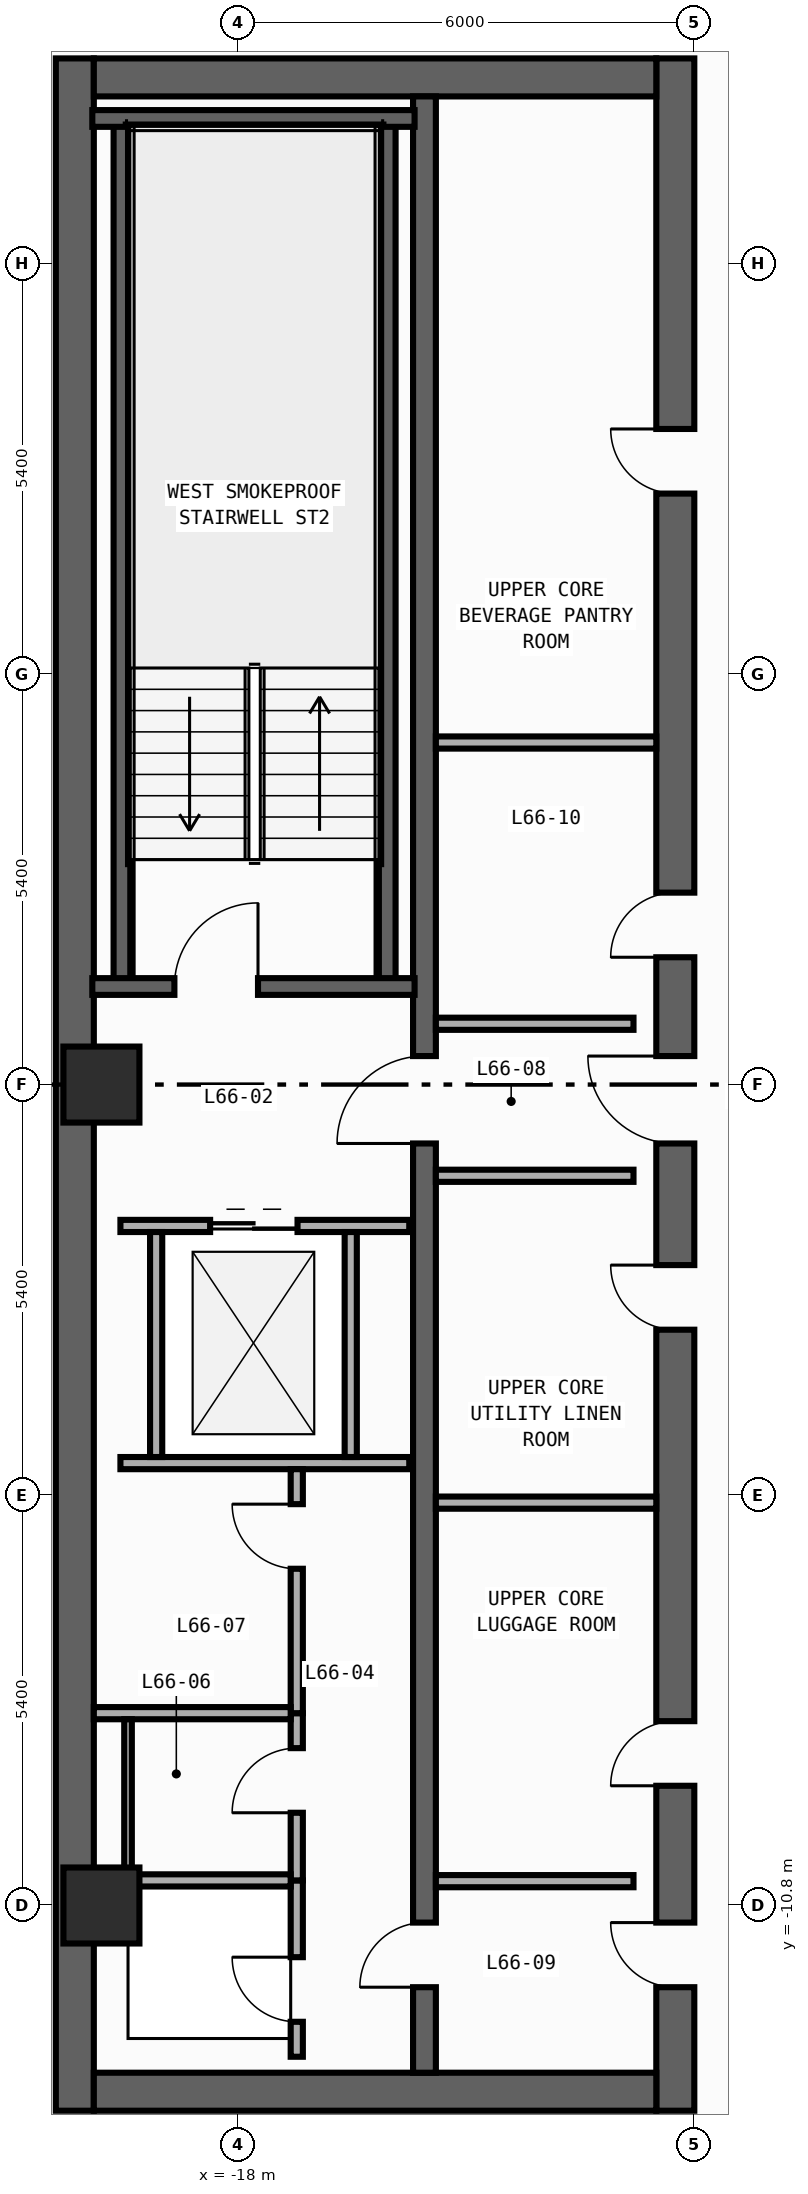
"""IFC4 building model, lengths in metres.
Left out: names, types, materials, properties, quantities, classifications, styles, units other than length and angle.
Written with IfcOpenShell. Run it as: python <this file> out.ifc"""

import sys

from ifc_helpers import new_model, si_unit, direction, frame, frame_2d, origin, origin_2d, place, context, subcontext, project, spatial, rectangle, circle, extrude, element, fill, save


model = new_model("IFC4")
c1 = context("Model", 3, precision=1e-05, world=origin(), true_north=direction((0.0, 1.0)))
c2 = subcontext(c1, "Body", "Model", "MODEL_VIEW")
j1 = project(units=[si_unit("LENGTHUNIT", "METRE"), si_unit("PLANEANGLEUNIT", "RADIAN")], contexts=[c1])
p1 = place(None, origin())
s1 = spatial("IfcSite", under=j1, at=p1, CompositionType="ELEMENT")
p2 = place(p1, origin())
s2 = spatial("IfcBuilding", under=s1, at=p2, CompositionType="ELEMENT")
p3 = place(p2, frame((0.0, 0.0, 277.6)))
s3 = spatial("IfcBuildingStorey", under=s2, at=p3, CompositionType="ELEMENT", Elevation=277.6)
p4 = place(p3, frame((-20.15, -13.5, 0.0), z_axis=(0.0, 0.0, 1.0), x_axis=(0.0, 1.0, 0.0)))
e1 = element("IfcWall", 1, at=p4, inside=s3, PredefinedType="SHEAR", context=c2, shape_type="SweptSolid", body=[
    extrude(rectangle(XDim=27.0, YDim=0.5, at=frame_2d((13.5, 0.0))), origin(), (0.0, 0.0, 1.0), 3.54),
])
p5 = place(p3, frame((-12.25, -13.5, 0.0), z_axis=(0.0, 0.0, 1.0), x_axis=(0.0, 1.0, 0.0)))
e2 = element("IfcWall", 2, at=p5, inside=s3, PredefinedType="SHEAR", context=c2, shape_type="SweptSolid", body=[
    extrude(rectangle(XDim=27.0, YDim=0.5, at=frame_2d((13.5, 0.0))), origin(), (0.0, 0.0, 1.0), 3.54),
])
p6 = place(p5, frame((15.175, 0.0, 0.0)))
e3 = element("IfcOpeningElement", 3, at=p6, cuts=e2, PredefinedType="OPENING", context=c2, shape_type="SweptSolid", body=[
    extrude(rectangle(XDim=0.85, YDim=2.1, at=frame_2d((0.425, 1.05))), frame((0.0, 0.26, 0.0), z_axis=(0.0, -1.0, 0.0), x_axis=(1.0, 0.0, 0.0)), (0.0, 0.0, 1.0), 0.52),
])
p7 = place(p5, frame((21.275, 0.0, 0.0)))
e4 = element("IfcOpeningElement", 4, at=p7, cuts=e2, PredefinedType="OPENING", context=c2, shape_type="SweptSolid", body=[
    extrude(rectangle(XDim=0.85, YDim=2.1, at=frame_2d((0.425, 1.05))), frame((0.0, 0.26, 0.0), z_axis=(0.0, -1.0, 0.0), x_axis=(1.0, 0.0, 0.0)), (0.0, 0.0, 1.0), 0.52),
])
p8 = place(p5, frame((4.275, 0.0, 0.0)))
e5 = element("IfcOpeningElement", 5, at=p8, cuts=e2, PredefinedType="OPENING", context=c2, shape_type="SweptSolid", body=[
    extrude(rectangle(XDim=0.85, YDim=2.1, at=frame_2d((0.425, 1.05))), frame((0.0, 0.26, 0.0), z_axis=(0.0, -1.0, 0.0), x_axis=(1.0, 0.0, 0.0)), (0.0, 0.0, 1.0), 0.52),
])
p9 = place(p5, frame((10.275, 0.0, 0.0)))
e6 = element("IfcOpeningElement", 6, at=p9, cuts=e2, PredefinedType="OPENING", context=c2, shape_type="SweptSolid", body=[
    extrude(rectangle(XDim=0.85, YDim=2.1, at=frame_2d((0.425, 1.05))), frame((0.0, 0.26, 0.0), z_axis=(0.0, -1.0, 0.0), x_axis=(1.0, 0.0, 0.0)), (0.0, 0.0, 1.0), 0.52),
])
p10 = place(p5, frame((12.725, 0.0, 0.0)))
e7 = element("IfcOpeningElement", 7, at=p10, cuts=e2, PredefinedType="OPENING", context=c2, shape_type="SweptSolid", body=[
    extrude(rectangle(XDim=1.15, YDim=2.2, at=frame_2d((0.575, 1.1))), frame((0.0, 0.26, 0.0), z_axis=(0.0, -1.0, 0.0), x_axis=(1.0, 0.0, 0.0)), (0.0, 0.0, 1.0), 0.52),
])
p11 = place(p5, frame((1.625, 0.0, 0.0)))
e8 = element("IfcOpeningElement", 8, at=p11, cuts=e2, PredefinedType="OPENING", context=c2, shape_type="SweptSolid", body=[
    extrude(rectangle(XDim=0.85, YDim=2.1, at=frame_2d((0.425, 1.05))), frame((0.0, 0.26, 0.0), z_axis=(0.0, -1.0, 0.0), x_axis=(1.0, 0.0, 0.0)), (0.0, 0.0, 1.0), 0.52),
])
for number, where, z_axis, x_axis in (
    (9, (-19.9, -13.25, 0.0), (0.0, 0.0, 1.0), (1.0, 0.0, 0.0)),
    (10, (-19.9, 13.25, 0.0), (0.0, 0.0, 1.0), (1.0, 0.0, 0.0)),
):
    element("IfcWall", number, at=place(p3, frame(where, z_axis=z_axis, x_axis=x_axis)), inside=s3, PredefinedType="SHEAR", context=c2, shape_type="SweptSolid", body=[
        extrude(rectangle(XDim=7.4, YDim=0.5, at=frame_2d((3.7, 0.0))), origin(), (0.0, 0.0, 1.0), 3.54),
    ])
p12 = place(p3, frame((-15.55, -13.0, 0.0), z_axis=(0.0, 0.0, 1.0), x_axis=(0.0, 1.0, 0.0)))
e11 = element("IfcWall", 11, at=p12, inside=s3, PredefinedType="SHEAR", context=c2, shape_type="SweptSolid", body=[
    extrude(rectangle(XDim=26.0, YDim=0.3, at=frame_2d((13.0, 0.0))), origin(), (0.0, 0.0, 1.0), 3.54),
])
p13 = place(p12, frame((12.225, 0.0, 0.0)))
e12 = element("IfcOpeningElement", 12, at=p13, cuts=e11, PredefinedType="OPENING", context=c2, shape_type="SweptSolid", body=[
    extrude(rectangle(XDim=1.15, YDim=2.2, at=frame_2d((0.575, 1.1))), frame((0.0, 0.16, 0.0), z_axis=(0.0, -1.0, 0.0), x_axis=(1.0, 0.0, 0.0)), (0.0, 0.0, 1.0), 0.32),
])
p14 = place(p12, frame((1.125, 0.0, 0.0)))
e13 = element("IfcOpeningElement", 13, at=p14, cuts=e11, PredefinedType="OPENING", context=c2, shape_type="SweptSolid", body=[
    extrude(rectangle(XDim=0.85, YDim=2.1, at=frame_2d((0.425, 1.05))), frame((0.0, 0.16, 0.0), z_axis=(0.0, -1.0, 0.0), x_axis=(1.0, 0.0, 0.0)), (0.0, 0.0, 1.0), 0.32),
])
for number, where, z_axis, x_axis in (
    (14, (-16.04, 1.29, 0.0), (0.0, 0.0, 1.0), (0.0, 1.0, 0.0)),
    (15, (-19.53, 1.29, 0.0), (0.0, 0.0, 1.0), (0.0, 1.0, 0.0)),
):
    element("IfcWall", number, at=place(p3, frame(where, z_axis=z_axis, x_axis=x_axis)), inside=s3, PredefinedType="SHEAR", context=c2, shape_type="SweptSolid", body=[
        extrude(rectangle(XDim=11.42, YDim=0.22, at=frame_2d((5.71, 0.0))), origin(), (0.0, 0.0, 1.0), 3.54),
    ])
p15 = place(p3, frame((-19.92, 12.71, 0.0), z_axis=(0.0, 0.0, 1.0), x_axis=(1.0, 0.0, 0.0)))
e16 = element("IfcWall", 16, at=p15, inside=s3, PredefinedType="SHEAR", context=c2, shape_type="SweptSolid", body=[
    extrude(rectangle(XDim=4.24, YDim=0.22, at=frame_2d((2.12, 0.0))), origin(), (0.0, 0.0, 1.0), 3.54),
])
p16 = place(p3, frame((-19.92, 1.29, 0.0), z_axis=(0.0, 0.0, 1.0), x_axis=(1.0, 0.0, 0.0)))
e17 = element("IfcWall", 17, at=p16, inside=s3, PredefinedType="SHEAR", context=c2, shape_type="SweptSolid", body=[
    extrude(rectangle(XDim=4.24, YDim=0.22, at=frame_2d((2.12, 0.0))), origin(), (0.0, 0.0, 1.0), 3.54),
])
p17 = place(p16, frame((1.08, 0.0, 0.0)))
e18 = element("IfcOpeningElement", 18, at=p17, cuts=e17, PredefinedType="OPENING", context=c2, shape_type="SweptSolid", body=[
    extrude(rectangle(XDim=1.1, YDim=2.2, at=frame_2d((0.55, 1.1))), frame((0.0, 0.12, 0.0), z_axis=(0.0, -1.0, 0.0), x_axis=(1.0, 0.0, 0.0)), (0.0, 0.0, 1.0), 0.24),
])
for number, where, z_axis, x_axis in (
    (19, (-19.8, -10.8, 0.0), (0.0, 0.0, 1.0), (1.0, 0.0, 0.0)),
    (20, (-19.8, 0.0, 0.0), (0.0, 0.0, 1.0), (1.0, 0.0, 0.0)),
):
    element("IfcColumn", number, at=place(p3, frame(where, z_axis=z_axis, x_axis=x_axis)), inside=s3, PredefinedType="COLUMN", context=c2, shape_type="SweptSolid", body=[
        extrude(circle(Radius=0.5, at=origin_2d()), origin(), (0.0, 0.0, 1.0), 3.8),
    ])
p18 = place(p3, frame((-19.55, -1.86, 0.0), z_axis=(0.0, 0.0, 1.0), x_axis=(1.0, 0.0, 0.0)))
e21 = element("IfcWall", 21, at=p18, inside=s3, PredefinedType="STANDARD", context=c2, shape_type="SweptSolid", body=[
    extrude(rectangle(XDim=3.8, YDim=0.16, at=frame_2d((1.9, 0.0))), origin(), (0.0, 0.0, 1.0), 3.54),
])
p19 = place(p18, frame((1.18, 0.0, 0.0)))
e22 = element("IfcOpeningElement", 22, at=p19, cuts=e21, PredefinedType="OPENING", context=c2, shape_type="SweptSolid", body=[
    extrude(rectangle(XDim=1.15, YDim=2.2, at=frame_2d((0.575, 1.1))), frame((0.0, 0.09, 0.0), z_axis=(0.0, -1.0, 0.0), x_axis=(1.0, 0.0, 0.0)), (0.0, 0.0, 1.0), 0.18),
])
p20 = place(p3, frame((-19.55, -4.98, 0.0), z_axis=(0.0, 0.0, 1.0), x_axis=(1.0, 0.0, 0.0)))
e23 = element("IfcWall", 23, at=p20, inside=s3, PredefinedType="STANDARD", context=c2, shape_type="SweptSolid", body=[
    extrude(rectangle(XDim=3.8, YDim=0.16, at=frame_2d((1.9, 0.0))), origin(), (0.0, 0.0, 1.0), 3.54),
])
for number, where, z_axis, x_axis in (
    (24, (-19.08, -4.9, 0.0), (0.0, 0.0, 1.0), (0.0, 1.0, 0.0)),
    (25, (-16.52, -4.9, 0.0), (0.0, 0.0, 1.0), (0.0, 1.0, 0.0)),
):
    element("IfcWall", number, at=place(p3, frame(where, z_axis=z_axis, x_axis=x_axis)), inside=s3, PredefinedType="STANDARD", context=c2, shape_type="SweptSolid", body=[
        extrude(rectangle(XDim=2.96, YDim=0.16, at=frame_2d((1.48, 0.0))), origin(), (0.0, 0.0, 1.0), 3.54),
    ])
for number, where, z_axis, x_axis in (
    (26, (-15.4, 0.8, 0.0), (0.0, 0.0, 1.0), (1.0, 0.0, 0.0)),
    (27, (-15.4, -1.2, 0.0), (0.0, 0.0, 1.0), (1.0, 0.0, 0.0)),
    (28, (-15.4, -10.48, 0.0), (0.0, 0.0, 1.0), (1.0, 0.0, 0.0)),
):
    element("IfcWall", number, at=place(p3, frame(where, z_axis=z_axis, x_axis=x_axis)), inside=s3, PredefinedType="STANDARD", context=c2, shape_type="SweptSolid", body=[
        extrude(rectangle(XDim=2.6, YDim=0.16, at=frame_2d((1.3, 0.0))), origin(), (0.0, 0.0, 1.0), 3.54),
    ])
p21 = place(p3, frame((-17.23, -12.79, 0.0), z_axis=(0.0, 0.0, 1.0), x_axis=(0.0, 1.0, 0.0)))
e29 = element("IfcWall", 29, at=p21, inside=s3, PredefinedType="PARTITIONING", context=c2, shape_type="SweptSolid", body=[
    extrude(rectangle(XDim=2.32, YDim=0.16, at=frame_2d((1.16, 0.0))), origin(), (0.0, 0.0, 1.0), 3.54),
])
p22 = place(p21, frame((0.46, 0.0, 0.0)))
e30 = element("IfcOpeningElement", 30, at=p22, cuts=e29, PredefinedType="OPENING", context=c2, shape_type="SweptSolid", body=[
    extrude(rectangle(XDim=0.85, YDim=2.1, at=frame_2d((0.425, 1.05))), frame((0.0, 0.09, 0.0), z_axis=(0.0, -1.0, 0.0), x_axis=(1.0, 0.0, 0.0)), (0.0, 0.0, 1.0), 0.18),
])
p23 = place(p3, frame((-17.23, -10.47, 0.0), z_axis=(0.0, 0.0, 1.0), x_axis=(0.0, 1.0, 0.0)))
e31 = element("IfcWall", 31, at=p23, inside=s3, PredefinedType="PARTITIONING", context=c2, shape_type="SweptSolid", body=[
    extrude(rectangle(XDim=2.2, YDim=0.16, at=frame_2d((1.1, 0.0))), origin(), (0.0, 0.0, 1.0), 3.54),
])
p24 = place(p23, frame((0.89, 0.0, 0.0)))
e32 = element("IfcOpeningElement", 32, at=p24, cuts=e31, PredefinedType="OPENING", context=c2, shape_type="SweptSolid", body=[
    extrude(rectangle(XDim=0.85, YDim=2.1, at=frame_2d((0.425, 1.05))), frame((0.0, 0.09, 0.0), z_axis=(0.0, -1.0, 0.0), x_axis=(1.0, 0.0, 0.0)), (0.0, 0.0, 1.0), 0.18),
])
p25 = place(p3, frame((-17.23, -8.27, 0.0), z_axis=(0.0, 0.0, 1.0), x_axis=(0.0, 1.0, 0.0)))
e33 = element("IfcWall", 33, at=p25, inside=s3, PredefinedType="PARTITIONING", context=c2, shape_type="SweptSolid", body=[
    extrude(rectangle(XDim=3.21, YDim=0.16, at=frame_2d((1.605, 0.0))), origin(), (0.0, 0.0, 1.0), 3.54),
])
p26 = place(p25, frame((1.9, 0.0, 0.0)))
e34 = element("IfcOpeningElement", 34, at=p26, cuts=e33, PredefinedType="OPENING", context=c2, shape_type="SweptSolid", body=[
    extrude(rectangle(XDim=0.85, YDim=2.1, at=frame_2d((0.425, 1.05))), frame((0.0, 0.09, 0.0), z_axis=(0.0, -1.0, 0.0), x_axis=(1.0, 0.0, 0.0)), (0.0, 0.0, 1.0), 0.18),
])
p27 = place(p3, frame((-19.75, -10.47, 0.0), z_axis=(0.0, 0.0, 1.0), x_axis=(1.0, 0.0, 0.0)))
e35 = element("IfcWall", 35, at=p27, inside=s3, PredefinedType="PARTITIONING", context=c2, shape_type="SweptSolid", body=[
    extrude(rectangle(XDim=2.44, YDim=0.16, at=frame_2d((1.22, 0.0))), origin(), (0.0, 0.0, 1.0), 3.54),
])
p28 = place(p3, frame((-19.9, -8.27, 0.0), z_axis=(0.0, 0.0, 1.0), x_axis=(1.0, 0.0, 0.0)))
e36 = element("IfcWall", 36, at=p28, inside=s3, PredefinedType="PARTITIONING", context=c2, shape_type="SweptSolid", body=[
    extrude(rectangle(XDim=2.59, YDim=0.16, at=frame_2d((1.295, 0.0))), origin(), (0.0, 0.0, 1.0), 3.54),
])
for number, where, z_axis, x_axis in (
    (37, (-15.4, 4.5, 0.0), (0.0, 0.0, 1.0), (1.0, 0.0, 0.0)),
    (38, (-15.4, -5.5, 0.0), (0.0, 0.0, 1.0), (1.0, 0.0, 0.0)),
):
    element("IfcWall", number, at=place(p3, frame(where, z_axis=z_axis, x_axis=x_axis)), inside=s3, PredefinedType="PARTITIONING", context=c2, shape_type="SweptSolid", body=[
        extrude(rectangle(XDim=2.9, YDim=0.16, at=frame_2d((1.45, 0.0))), origin(), (0.0, 0.0, 1.0), 3.54),
    ])
p29 = place(p3, frame((-19.45, -10.39, 0.0), z_axis=(0.0, 0.0, 1.0), x_axis=(0.0, 1.0, 0.0)))
e39 = element("IfcWall", 39, at=p29, inside=s3, PredefinedType="PARTITIONING", context=c2, shape_type="SweptSolid", body=[
    extrude(rectangle(XDim=2.04, YDim=0.1, at=frame_2d((1.02, 0.0))), origin(), (0.0, 0.0, 1.0), 3.54),
])
p30 = place(p17, origin())
e40 = element("IfcDoor", 40, at=p30, inside=s3, OperationType="SINGLE_SWING_RIGHT", PredefinedType="DOOR", context=c2, shape_type="SweptSolid", body=[
    extrude(rectangle(XDim=1.1, YDim=2.2, at=frame_2d((0.55, 1.1))), frame((0.0, 0.025, 0.0), z_axis=(0.0, -1.0, 0.0), x_axis=(1.0, 0.0, 0.0)), (0.0, 0.0, 1.0), 0.05),
])
fill(e18, e40)
p31 = place(p6, origin())
e41 = element("IfcDoor", 41, at=p31, inside=s3, OperationType="SINGLE_SWING_LEFT", PredefinedType="DOOR", context=c2, shape_type="SweptSolid", body=[
    extrude(rectangle(XDim=0.85, YDim=2.1, at=frame_2d((0.425, 1.05))), frame((0.0, 0.025, 0.0), z_axis=(0.0, -1.0, 0.0), x_axis=(1.0, 0.0, 0.0)), (0.0, 0.0, 1.0), 0.05),
])
fill(e3, e41)
p32 = place(p7, origin())
e42 = element("IfcDoor", 42, at=p32, inside=s3, OperationType="SINGLE_SWING_RIGHT", PredefinedType="DOOR", context=c2, shape_type="SweptSolid", body=[
    extrude(rectangle(XDim=0.85, YDim=2.1, at=frame_2d((0.425, 1.05))), frame((0.0, 0.025, 0.0), z_axis=(0.0, -1.0, 0.0), x_axis=(1.0, 0.0, 0.0)), (0.0, 0.0, 1.0), 0.05),
])
fill(e4, e42)
p33 = place(p8, origin())
e43 = element("IfcDoor", 43, at=p33, inside=s3, OperationType="SINGLE_SWING_LEFT", PredefinedType="DOOR", context=c2, shape_type="SweptSolid", body=[
    extrude(rectangle(XDim=0.85, YDim=2.1, at=frame_2d((0.425, 1.05))), frame((0.0, 0.025, 0.0), z_axis=(0.0, -1.0, 0.0), x_axis=(1.0, 0.0, 0.0)), (0.0, 0.0, 1.0), 0.05),
])
fill(e5, e43)
p34 = place(p9, origin())
e44 = element("IfcDoor", 44, at=p34, inside=s3, OperationType="SINGLE_SWING_RIGHT", PredefinedType="DOOR", context=c2, shape_type="SweptSolid", body=[
    extrude(rectangle(XDim=0.85, YDim=2.1, at=frame_2d((0.425, 1.05))), frame((0.0, 0.025, 0.0), z_axis=(0.0, -1.0, 0.0), x_axis=(1.0, 0.0, 0.0)), (0.0, 0.0, 1.0), 0.05),
])
fill(e6, e44)
p35 = place(p10, origin())
e45 = element("IfcDoor", 45, at=p35, inside=s3, OperationType="SINGLE_SWING_RIGHT", PredefinedType="DOOR", context=c2, shape_type="SweptSolid", body=[
    extrude(rectangle(XDim=1.15, YDim=2.2, at=frame_2d((0.575, 1.1))), frame((0.0, 0.025, 0.0), z_axis=(0.0, -1.0, 0.0), x_axis=(1.0, 0.0, 0.0)), (0.0, 0.0, 1.0), 0.05),
])
fill(e7, e45)
p36 = place(p13, origin())
e46 = element("IfcDoor", 46, at=p36, inside=s3, OperationType="SINGLE_SWING_LEFT", PredefinedType="DOOR", context=c2, shape_type="SweptSolid", body=[
    extrude(rectangle(XDim=1.15, YDim=2.2, at=frame_2d((0.575, 1.1))), frame((0.0, 0.025, 0.0), z_axis=(0.0, -1.0, 0.0), x_axis=(1.0, 0.0, 0.0)), (0.0, 0.0, 1.0), 0.05),
])
fill(e12, e46)
p37 = place(p11, origin())
e47 = element("IfcDoor", 47, at=p37, inside=s3, OperationType="SINGLE_SWING_RIGHT", PredefinedType="DOOR", context=c2, shape_type="SweptSolid", body=[
    extrude(rectangle(XDim=0.85, YDim=2.1, at=frame_2d((0.425, 1.05))), frame((0.0, 0.025, 0.0), z_axis=(0.0, -1.0, 0.0), x_axis=(1.0, 0.0, 0.0)), (0.0, 0.0, 1.0), 0.05),
])
fill(e8, e47)
p38 = place(p14, origin())
e48 = element("IfcDoor", 48, at=p38, inside=s3, OperationType="SINGLE_SWING_LEFT", PredefinedType="DOOR", context=c2, shape_type="SweptSolid", body=[
    extrude(rectangle(XDim=0.85, YDim=2.1, at=frame_2d((0.425, 1.05))), frame((0.0, 0.025, 0.0), z_axis=(0.0, -1.0, 0.0), x_axis=(1.0, 0.0, 0.0)), (0.0, 0.0, 1.0), 0.05),
])
fill(e13, e48)
p39 = place(p19, origin())
e49 = element("IfcDoor", 49, at=p39, inside=s3, OperationType="DOUBLE_DOOR_SLIDING", PredefinedType="DOOR", context=c2, shape_type="SweptSolid", body=[
    extrude(rectangle(XDim=1.15, YDim=2.2, at=frame_2d((0.575, 1.1))), frame((0.0, 0.025, 0.0), z_axis=(0.0, -1.0, 0.0), x_axis=(1.0, 0.0, 0.0)), (0.0, 0.0, 1.0), 0.05),
])
fill(e22, e49)
p40 = place(p22, origin())
e50 = element("IfcDoor", 50, at=p40, inside=s3, OperationType="SINGLE_SWING_RIGHT", PredefinedType="DOOR", context=c2, shape_type="SweptSolid", body=[
    extrude(rectangle(XDim=0.85, YDim=2.1, at=frame_2d((0.425, 1.05))), frame((0.0, 0.025, 0.0), z_axis=(0.0, -1.0, 0.0), x_axis=(1.0, 0.0, 0.0)), (0.0, 0.0, 1.0), 0.05),
])
fill(e30, e50)
p41 = place(p24, origin())
e51 = element("IfcDoor", 51, at=p41, inside=s3, OperationType="SINGLE_SWING_LEFT", PredefinedType="DOOR", context=c2, shape_type="SweptSolid", body=[
    extrude(rectangle(XDim=0.85, YDim=2.1, at=frame_2d((0.425, 1.05))), frame((0.0, 0.025, 0.0), z_axis=(0.0, -1.0, 0.0), x_axis=(1.0, 0.0, 0.0)), (0.0, 0.0, 1.0), 0.05),
])
fill(e32, e51)
p42 = place(p26, origin())
e52 = element("IfcDoor", 52, at=p42, inside=s3, OperationType="SINGLE_SWING_RIGHT", PredefinedType="DOOR", context=c2, shape_type="SweptSolid", body=[
    extrude(rectangle(XDim=0.85, YDim=2.1, at=frame_2d((0.425, 1.05))), frame((0.0, 0.025, 0.0), z_axis=(0.0, -1.0, 0.0), x_axis=(1.0, 0.0, 0.0)), (0.0, 0.0, 1.0), 0.05),
])
fill(e34, e52)
save(model, sys.argv[1])
